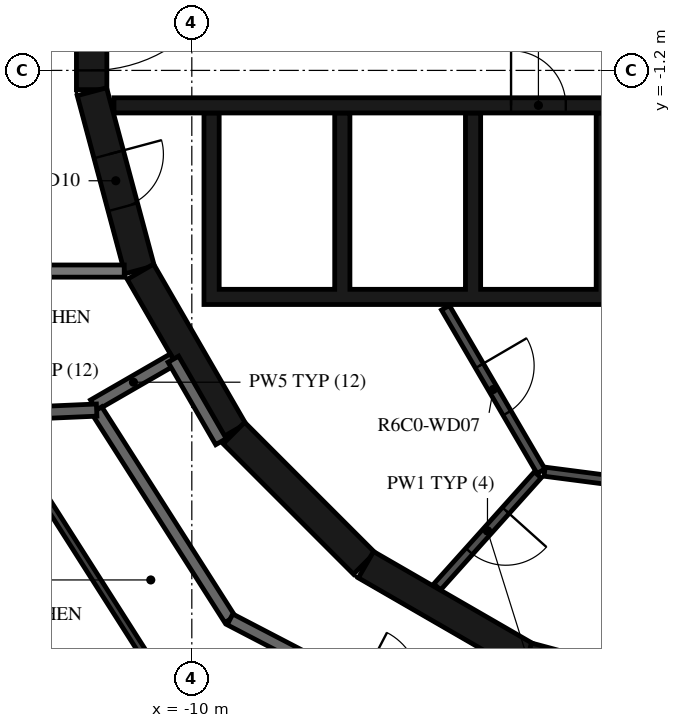
"""IFC4 building model, lengths in metres.
Left out: names, types, materials, properties, quantities, classifications, styles, units other than length and angle.
Written with IfcOpenShell. Run it as: python <this file> out.ifc"""

import sys

from ifc_helpers import new_model, si_unit, direction, frame, frame_2d, origin, place, context, subcontext, project, spatial, polyline, rectangle, outline, extrude, element, fill, save


model = new_model("IFC4")
c1 = context("Model", 3, precision=1e-05, world=origin(), true_north=direction((0.0, 1.0)))
c2 = subcontext(c1, "Body", "Model", "MODEL_VIEW")
j1 = project(units=[si_unit("LENGTHUNIT", "METRE"), si_unit("PLANEANGLEUNIT", "RADIAN")], contexts=[c1])
p1 = place(None, origin())
s1 = spatial("IfcSite", under=j1, at=p1, CompositionType="ELEMENT")
p2 = place(p1, origin())
s2 = spatial("IfcBuilding", under=s1, at=p2, CompositionType="ELEMENT")
p3 = place(p2, frame((0.0, 0.0, 254.7)))
s3 = spatial("IfcBuildingStorey", under=s2, at=p3, CompositionType="ELEMENT", Elevation=254.7)
p4 = place(p3, frame((-11.647, 1.516, 0.0), z_axis=(0.0, 0.0, 1.0), x_axis=(0.0, -1.0, 0.0)))
e1 = element("IfcWall", 1, at=p4, inside=s3, PredefinedType="SHEAR", context=c2, shape_type="SweptSolid", body=[
    extrude(rectangle(XDim=3.033, YDim=0.5, at=frame_2d((1.516, 0.0))), origin(), (0.0, 0.0, 1.0), 3.05),
])
p5 = place(p4, frame((0.316, 0.0, 0.0)))
e2 = element("IfcOpeningElement", 2, at=p5, cuts=e1, PredefinedType="OPENING", context=c2, shape_type="SweptSolid", body=[
    extrude(rectangle(XDim=2.4, YDim=2.1, at=frame_2d((1.2, 1.05))), frame((0.0, 0.26, 0.0), z_axis=(0.0, -1.0, 0.0), x_axis=(1.0, 0.0, 0.0)), (0.0, 0.0, 1.0), 0.52),
])
p6 = place(p3, frame((-11.643, -1.55, 0.0), z_axis=(0.0, 0.0, 1.0), x_axis=(0.258734743916, -0.965948410781, 0.0)))
e3 = element("IfcWall", 3, at=p6, inside=s3, PredefinedType="SHEAR", context=c2, shape_type="SweptSolid", body=[
    extrude(rectangle(XDim=3.033, YDim=0.5, at=frame_2d((1.516, 0.0))), origin(), (0.0, 0.0, 1.0), 3.05),
])
p7 = place(p6, frame((1.066, 0.0, 0.0)))
e4 = element("IfcOpeningElement", 4, at=p7, cuts=e3, PredefinedType="OPENING", context=c2, shape_type="SweptSolid", body=[
    extrude(rectangle(XDim=0.9, YDim=2.1, at=frame_2d((0.45, 1.05))), frame((0.0, 0.26, 0.0), z_axis=(0.0, -1.0, 0.0), x_axis=(1.0, 0.0, 0.0)), (0.0, 0.0, 1.0), 0.52),
])
p8 = place(p3, frame((-10.845, -4.51, 0.0), z_axis=(0.0, 0.0, 1.0), x_axis=(0.500087131594, -0.865975092491, 0.0)))
e5 = element("IfcWall", 5, at=p8, inside=s3, PredefinedType="SHEAR", context=c2, shape_type="SweptSolid", body=[
    extrude(rectangle(XDim=3.033, YDim=0.5, at=frame_2d((1.516, 0.0))), origin(), (0.0, 0.0, 1.0), 3.05),
])
p9 = place(p3, frame((-9.308, -7.164, 0.0), z_axis=(0.0, 0.0, 1.0), x_axis=(0.707106781187, -0.707106781187, 0.0)))
e6 = element("IfcWall", 6, at=p9, inside=s3, PredefinedType="SHEAR", context=c2, shape_type="SweptSolid", body=[
    extrude(rectangle(XDim=3.032, YDim=0.5, at=frame_2d((1.516, 0.0))), origin(), (0.0, 0.0, 1.0), 3.05),
])
for number, where, z_axis, x_axis in (
    (7, (-7.137, -9.329, 0.0), (0.0, 0.0, 1.0), (0.866, -0.5, 0.0)),
    (8, (-4.479, -10.858, 0.0), (0.0, 0.0, 1.0), (0.966, -0.259, 0.0)),
):
    element("IfcWall", number, at=place(p3, frame(where, z_axis=z_axis, x_axis=x_axis)), inside=s3, PredefinedType="SHEAR", context=c2, shape_type="SweptSolid", body=[
        extrude(rectangle(XDim=3.033, YDim=0.5, at=frame_2d((1.516, 0.0))), origin(), (0.0, 0.0, 1.0), 3.05),
    ])
p10 = place(p3, origin())
e9 = element("IfcWall", 9, at=p10, inside=s3, PredefinedType="SHEAR", context=c2, shape_type="SweptSolid", body=[
    extrude(outline(polyline([(9.8, -5.05), (9.8, -4.8), (9.8, -1.9), (9.55, -1.9), (9.55, -4.8), (7.65, -4.8), (7.65, -1.9), (7.4, -1.9), (7.4, -4.8), (5.5, -4.8), (5.5, -1.9), (5.25, -1.9), (5.25, -4.8), (3.35, -4.8), (3.35, -1.9), (3.1, -1.9), (3.1, -4.8), (1.2, -4.8), (1.2, -1.9), (0.95, -1.9), (0.95, -4.8), (-0.95, -4.8), (-0.95, -1.9), (-1.2, -1.9), (-1.2, -4.8), (-3.1, -4.8), (-3.1, -1.9), (-3.35, -1.9), (-3.35, -4.8), (-5.25, -4.8), (-5.25, -1.9), (-5.5, -1.9), (-5.5, -4.8), (-7.4, -4.8), (-7.4, -1.9), (-7.65, -1.9), (-7.65, -4.8), (-9.55, -4.8), (-9.55, -1.9), (-9.8, -1.9), (-9.8, -4.8), (-9.8, -5.05), (9.8, -5.05)])), origin(), (0.0, 0.0, 1.0), 3.05),
])
p11 = place(p3, frame((-11.28, -1.775, 0.0), z_axis=(0.0, 0.0, 1.0), x_axis=(1.0, 0.0, 0.0)))
e10 = element("IfcWall", 10, at=p11, inside=s3, PredefinedType="SHEAR", context=c2, shape_type="SweptSolid", body=[
    extrude(rectangle(XDim=14.38, YDim=0.25, at=frame_2d((7.19, 0.0))), origin(), (0.0, 0.0, 1.0), 3.05),
])
p12 = place(p11, frame((12.88, 0.0, 0.0)))
e11 = element("IfcOpeningElement", 11, at=p12, cuts=e10, PredefinedType="OPENING", context=c2, shape_type="SweptSolid", body=[
    extrude(rectangle(XDim=1.1, YDim=2.1, at=frame_2d((0.55, 1.05))), frame((0.0, 0.135, 0.0), z_axis=(0.0, -1.0, 0.0), x_axis=(1.0, 0.0, 0.0)), (0.0, 0.0, 1.0), 0.27),
])
p13 = place(p11, frame((6.53, 0.0, 0.0)))
e12 = element("IfcOpeningElement", 12, at=p13, cuts=e10, PredefinedType="OPENING", context=c2, shape_type="SweptSolid", body=[
    extrude(rectangle(XDim=0.9, YDim=2.1, at=frame_2d((0.45, 1.05))), frame((0.0, 0.135, 0.0), z_axis=(0.0, -1.0, 0.0), x_axis=(1.0, 0.0, 0.0)), (0.0, 0.0, 1.0), 0.27),
])
p14 = place(p11, frame((8.68, 0.0, 0.0)))
e13 = element("IfcOpeningElement", 13, at=p14, cuts=e10, PredefinedType="OPENING", context=c2, shape_type="SweptSolid", body=[
    extrude(rectangle(XDim=0.9, YDim=2.1, at=frame_2d((0.45, 1.05))), frame((0.0, 0.135, 0.0), z_axis=(0.0, -1.0, 0.0), x_axis=(1.0, 0.0, 0.0)), (0.0, 0.0, 1.0), 0.27),
])
p15 = place(p11, frame((10.83, 0.0, 0.0)))
e14 = element("IfcOpeningElement", 14, at=p15, cuts=e10, PredefinedType="OPENING", context=c2, shape_type="SweptSolid", body=[
    extrude(rectangle(XDim=0.9, YDim=2.1, at=frame_2d((0.45, 1.05))), frame((0.0, 0.135, 0.0), z_axis=(0.0, -1.0, 0.0), x_axis=(1.0, 0.0, 0.0)), (0.0, 0.0, 1.0), 0.27),
])
p16 = place(p3, frame((-5.829, -5.102, 0.0), z_axis=(0.0, 0.0, 1.0), x_axis=(0.504480008384, -0.863423373057, 0.0)))
e15 = element("IfcWall", 15, at=p16, inside=s3, PredefinedType="PARTITIONING", context=c2, shape_type="SweptSolid", body=[
    extrude(rectangle(XDim=3.115, YDim=0.15, at=frame_2d((1.558, 0.0))), origin(), (0.0, 0.0, 1.0), 3.05),
])
p17 = place(p16, frame((1.107, 0.0, 0.0)))
e16 = element("IfcOpeningElement", 16, at=p17, cuts=e15, PredefinedType="OPENING", context=c2, shape_type="SweptSolid", body=[
    extrude(rectangle(XDim=0.9, YDim=2.1, at=frame_2d((0.45, 1.05))), frame((0.0, 0.085, 0.0), z_axis=(0.0, -1.0, 0.0), x_axis=(1.0, 0.0, 0.0)), (0.0, 0.0, 1.0), 0.17),
])
p18 = place(p3, frame((-4.311, -7.851, 0.0), z_axis=(0.0, 0.0, 1.0), x_axis=(-0.667869133096, -0.744278725383, 0.0)))
e17 = element("IfcWall", 17, at=p18, inside=s3, PredefinedType="PARTITIONING", context=c2, shape_type="SweptSolid", body=[
    extrude(rectangle(XDim=2.476, YDim=0.15, at=frame_2d((1.238, 0.0))), origin(), (0.0, 0.0, 1.0), 3.05),
])
p19 = place(p18, frame((0.788, 0.0, 0.0)))
e18 = element("IfcOpeningElement", 18, at=p19, cuts=e17, PredefinedType="OPENING", context=c2, shape_type="SweptSolid", body=[
    extrude(rectangle(XDim=0.9, YDim=2.1, at=frame_2d((0.45, 1.05))), frame((0.0, 0.085, 0.0), z_axis=(0.0, -1.0, 0.0), x_axis=(1.0, 0.0, 0.0)), (0.0, 0.0, 1.0), 0.17),
])
p20 = place(p3, frame((-4.198, -7.799, 0.0), z_axis=(0.0, 0.0, 1.0), x_axis=(0.991686747293, -0.128675542523, 0.0)))
e19 = element("IfcWall", 19, at=p20, inside=s3, PredefinedType="PARTITIONING", context=c2, shape_type="SweptSolid", body=[
    extrude(rectangle(XDim=1.793, YDim=0.15, at=frame_2d((0.896, 0.0))), origin(), (0.0, 0.0, 1.0), 3.05),
])
p21 = place(p3, frame((-10.303, -5.949, 0.0), z_axis=(0.0, 0.0, 1.0), x_axis=(-0.866043382451, -0.499968858743, 0.0)))
e20 = element("IfcWall", 20, at=p21, inside=s3, PredefinedType="STANDARD", context=c2, shape_type="SweptSolid", body=[
    extrude(rectangle(XDim=1.515, YDim=0.2, at=frame_2d((0.758, 0.0))), origin(), (0.0, 0.0, 1.0), 3.05),
])
p22 = place(p3, frame((-9.52, -7.305, 0.0), z_axis=(0.0, 0.0, 1.0), x_axis=(-0.500028278809, 0.866009076391, 0.0)))
e21 = element("IfcWall", 21, at=p22, inside=s3, PredefinedType="STANDARD", context=c2, shape_type="SweptSolid", body=[
    extrude(rectangle(XDim=1.566, YDim=0.2, at=frame_2d((0.783, 0.0))), origin(), (0.0, 0.0, 1.0), 3.05),
])
p23 = place(p3, frame((-11.565, -6.786, 0.0), z_axis=(0.0, 0.0, 1.0), x_axis=(0.537297327359, -0.843392898958, 0.0)))
e22 = element("IfcWall", 22, at=p23, inside=s3, PredefinedType="STANDARD", context=c2, shape_type="SweptSolid", body=[
    extrude(rectangle(XDim=4.081, YDim=0.2, at=frame_2d((2.041, 0.0))), origin(), (0.0, 0.0, 1.0), 3.05),
])
p24 = place(p3, frame((-9.372, -10.228, 0.0), z_axis=(0.0, 0.0, 1.0), x_axis=(0.887005184532, -0.461759464021, 0.0)))
e23 = element("IfcWall", 23, at=p24, inside=s3, PredefinedType="STANDARD", context=c2, shape_type="SweptSolid", body=[
    extrude(rectangle(XDim=7.181, YDim=0.2, at=frame_2d((3.591, 0.0))), origin(), (0.0, 0.0, 1.0), 3.05),
])
p25 = place(p24, frame((2.391, 0.0, 0.0)))
e24 = element("IfcOpeningElement", 24, at=p25, cuts=e23, PredefinedType="OPENING", context=c2, shape_type="SweptSolid", body=[
    extrude(rectangle(XDim=1.0, YDim=2.1, at=frame_2d((0.5, 1.05))), frame((0.0, 0.11, 0.0), z_axis=(0.0, -1.0, 0.0), x_axis=(1.0, 0.0, 0.0)), (0.0, 0.0, 1.0), 0.22),
])
p26 = place(p3, frame((-17.655, -4.5, 0.0), z_axis=(0.0, 0.0, 1.0), x_axis=(1.0, 0.0, 0.0)))
e25 = element("IfcWall", 25, at=p26, inside=s3, PredefinedType="STANDARD", context=c2, shape_type="SweptSolid", body=[
    extrude(rectangle(XDim=6.543, YDim=0.2, at=frame_2d((3.272, 0.0))), origin(), (0.0, 0.0, 1.0), 3.05),
])
p27 = place(p3, frame((-13.414, -6.867, 0.0), z_axis=(0.0, 0.0, 1.0), x_axis=(0.999046427216, 0.043660465726, 0.0)))
e26 = element("IfcWall", 26, at=p27, inside=s3, PredefinedType="STANDARD", context=c2, shape_type="SweptSolid", body=[
    extrude(rectangle(XDim=1.851, YDim=0.2, at=frame_2d((0.925, 0.0))), origin(), (0.0, 0.0, 1.0), 3.05),
])
p28 = place(p3, frame((-12.402, -8.265, 0.0), z_axis=(0.0, 0.0, 1.0), x_axis=(0.537321213777, -0.843377681247, 0.0)))
e27 = element("IfcWall", 27, at=p28, inside=s3, PredefinedType="PARTITIONING", context=c2, shape_type="SweptSolid", body=[
    extrude(rectangle(XDim=3.685, YDim=0.12, at=frame_2d((1.843, 0.0))), origin(), (0.0, 0.0, 1.0), 3.05),
])
p29 = place(p5, origin())
e28 = element("IfcDoor", 28, at=p29, inside=s3, OperationType="DOUBLE_DOOR_SINGLE_SWING", PredefinedType="DOOR", context=c2, shape_type="SweptSolid", body=[
    extrude(rectangle(XDim=2.4, YDim=2.1, at=frame_2d((1.2, 1.05))), frame((0.0, 0.025, 0.0), z_axis=(0.0, -1.0, 0.0), x_axis=(1.0, 0.0, 0.0)), (0.0, 0.0, 1.0), 0.05),
])
fill(e2, e28)
p30 = place(p13, origin())
e29 = element("IfcDoor", 29, at=p30, inside=s3, OperationType="SINGLE_SWING_LEFT", PredefinedType="DOOR", context=c2, shape_type="SweptSolid", body=[
    extrude(rectangle(XDim=0.9, YDim=2.1, at=frame_2d((0.45, 1.05))), frame((0.0, 0.025, 0.0), z_axis=(0.0, -1.0, 0.0), x_axis=(1.0, 0.0, 0.0)), (0.0, 0.0, 1.0), 0.05),
])
fill(e12, e29)
p31 = place(p19, origin())
e30 = element("IfcDoor", 30, at=p31, inside=s3, OperationType="SINGLE_SWING_RIGHT", PredefinedType="DOOR", context=c2, shape_type="SweptSolid", body=[
    extrude(rectangle(XDim=0.9, YDim=2.1, at=frame_2d((0.45, 1.05))), frame((0.0, 0.025, 0.0), z_axis=(0.0, -1.0, 0.0), x_axis=(1.0, 0.0, 0.0)), (0.0, 0.0, 1.0), 0.05),
])
fill(e18, e30)
p32 = place(p17, origin())
e31 = element("IfcDoor", 31, at=p32, inside=s3, OperationType="SINGLE_SWING_LEFT", PredefinedType="DOOR", context=c2, shape_type="SweptSolid", body=[
    extrude(rectangle(XDim=0.9, YDim=2.1, at=frame_2d((0.45, 1.05))), frame((0.0, 0.025, 0.0), z_axis=(0.0, -1.0, 0.0), x_axis=(1.0, 0.0, 0.0)), (0.0, 0.0, 1.0), 0.05),
])
fill(e16, e31)
p33 = place(p7, origin())
e32 = element("IfcDoor", 32, at=p33, inside=s3, OperationType="SINGLE_SWING_RIGHT", PredefinedType="DOOR", context=c2, shape_type="SweptSolid", body=[
    extrude(rectangle(XDim=0.9, YDim=2.1, at=frame_2d((0.45, 1.05))), frame((0.0, 0.025, 0.0), z_axis=(0.0, -1.0, 0.0), x_axis=(1.0, 0.0, 0.0)), (0.0, 0.0, 1.0), 0.05),
])
fill(e4, e32)
save(model, sys.argv[1])
